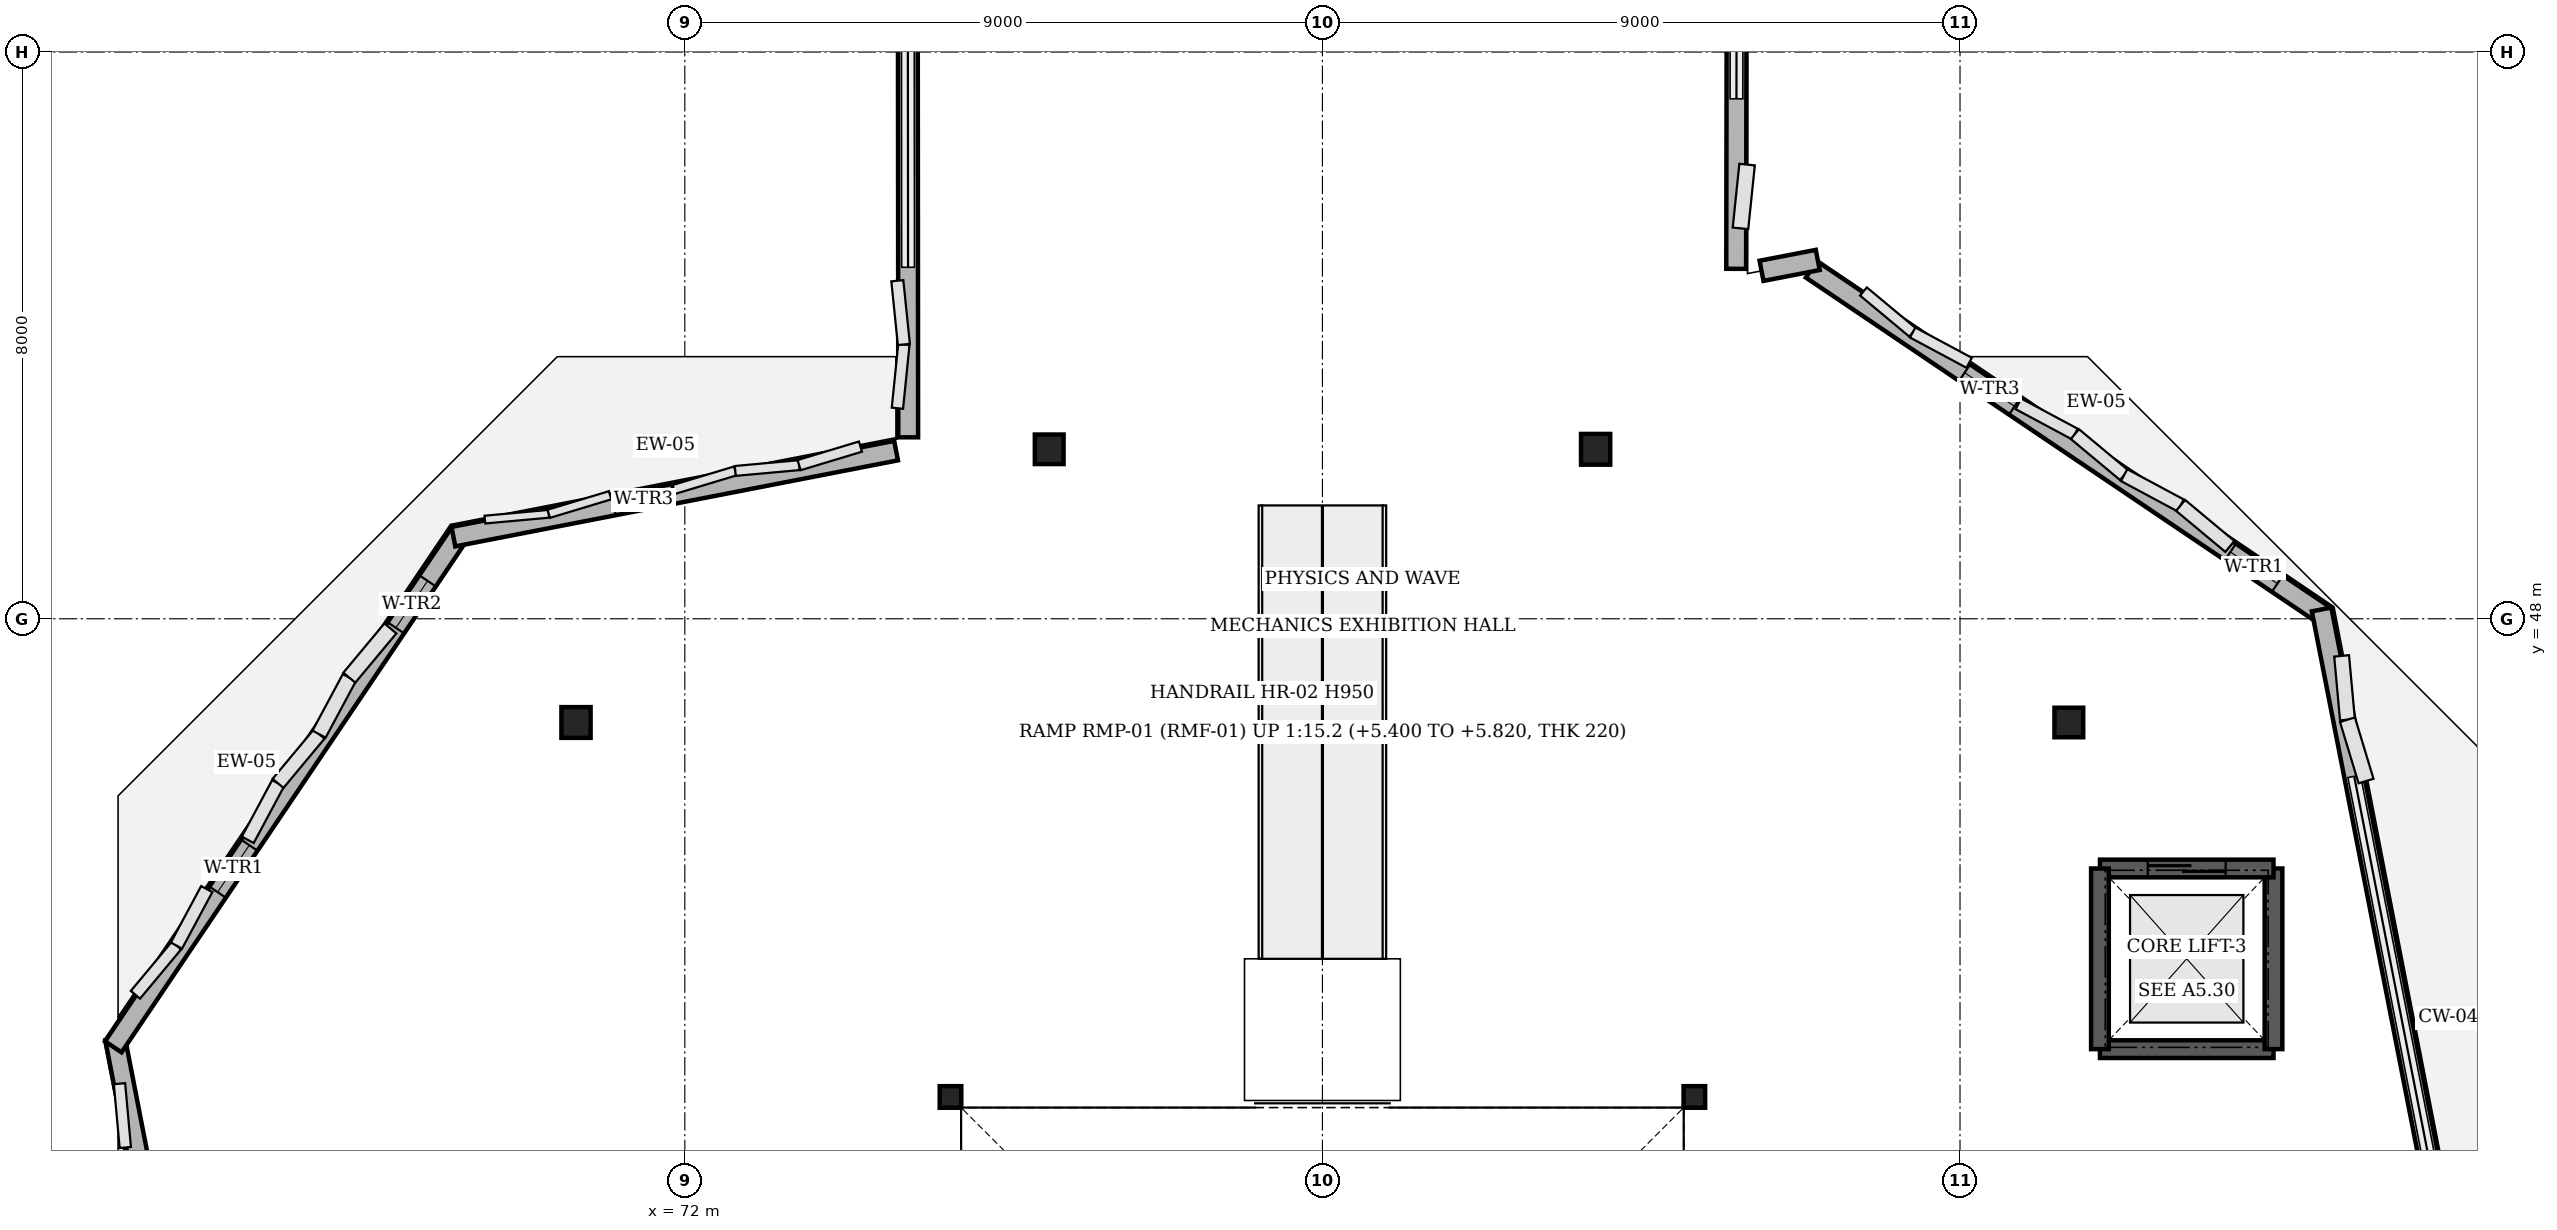
"""IFC4 building model, lengths in metres.
Left out: names, types, materials, properties, quantities, classifications, styles, units other than length and angle.
Written with IfcOpenShell. Run it as: python <this file> out.ifc"""

import sys

from ifc_helpers import new_model, si_unit, direction, frame, frame_2d, origin, origin_2d, place, context, subcontext, project, spatial, rectangle, hollow_rectangle, i_section, extrude, element, fill, save


model = new_model("IFC4")
c1 = context("Model", 3, precision=1e-05, world=origin(), true_north=direction((0.0, 1.0)))
c2 = subcontext(c1, "Body", "Model", "MODEL_VIEW")
j1 = project(units=[si_unit("LENGTHUNIT", "METRE"), si_unit("PLANEANGLEUNIT", "RADIAN")], contexts=[c1])
p1 = place(None, origin())
s1 = spatial("IfcSite", under=j1, at=p1, CompositionType="ELEMENT")
p2 = place(p1, origin())
s2 = spatial("IfcBuilding", under=s1, at=p2, CompositionType="ELEMENT")
p3 = place(p2, frame((0.0, 0.0, 5.4)))
s3 = spatial("IfcBuildingStorey", under=s2, at=p3, CompositionType="ELEMENT", Elevation=5.4)
p4 = place(p3, frame((91.536, 46.536, 0.0), z_axis=(0.0, 0.0, 1.0), x_axis=(1.0, 0.0, 0.0)))
e1 = element("IfcColumn", 1, at=p4, inside=s3, PredefinedType="COLUMN", context=c2, shape_type="SweptSolid", body=[
    extrude(i_section(OverallWidth=0.406, OverallDepth=0.417, WebThickness=0.03, FlangeThickness=0.044, FilletRadius=0.015, at=origin_2d()), origin(), (0.0, 0.0, 1.0), 5.4),
])
p5 = place(p3, frame((84.856, 50.392, 0.0), z_axis=(0.0, 0.0, 1.0), x_axis=(1.0, 0.0, 0.0)))
e2 = element("IfcColumn", 2, at=p5, inside=s3, PredefinedType="COLUMN", context=c2, shape_type="SweptSolid", body=[
    extrude(i_section(OverallWidth=0.412, OverallDepth=0.434, WebThickness=0.036, FlangeThickness=0.044, FilletRadius=0.015, at=origin_2d()), origin(), (0.0, 0.0, 1.0), 5.4),
])
p6 = place(p3, frame((77.144, 50.392, 0.0), z_axis=(0.0, 0.0, 1.0), x_axis=(1.0, 0.0, 0.0)))
e3 = element("IfcColumn", 3, at=p6, inside=s3, PredefinedType="COLUMN", context=c2, shape_type="SweptSolid", body=[
    extrude(i_section(OverallWidth=0.406, OverallDepth=0.417, WebThickness=0.03, FlangeThickness=0.044, FilletRadius=0.015, at=origin_2d()), origin(), (0.0, 0.0, 1.0), 5.4),
])
p7 = place(p3, frame((70.464, 46.536, 0.0), z_axis=(0.0, 0.0, 1.0), x_axis=(1.0, 0.0, 0.0)))
e4 = element("IfcColumn", 4, at=p7, inside=s3, PredefinedType="COLUMN", context=c2, shape_type="SweptSolid", body=[
    extrude(i_section(OverallWidth=0.412, OverallDepth=0.434, WebThickness=0.036, FlangeThickness=0.044, FilletRadius=0.015, at=origin_2d()), origin(), (0.0, 0.0, 1.0), 5.4),
])
for number, where, z_axis, x_axis in (
    (5, (86.25, 41.25, 0.0), (0.0, 0.0, 1.0), (1.0, 0.0, 0.0)),
    (6, (75.75, 41.25, 0.0), (0.0, 0.0, 1.0), (1.0, 0.0, 0.0)),
):
    element("IfcColumn", number, at=place(p3, frame(where, z_axis=z_axis, x_axis=x_axis)), inside=s3, PredefinedType="COLUMN", context=c2, shape_type="SweptSolid", body=[
        extrude(hollow_rectangle(XDim=0.305, YDim=0.305, WallThickness=0.015, InnerFilletRadius=0.015, OuterFilletRadius=0.029, at=origin_2d()), origin(), (0.0, 0.0, 1.0), 5.4),
    ])
p8 = place(p3, frame((87.902, 52.933, 0.0), z_axis=(0.0, 0.0, 1.0), x_axis=(0.829056819459, -0.559164367703, 0.0)))
e7 = element("IfcWall", 7, at=p8, inside=s3, PredefinedType="SOLIDWALL", context=c2, shape_type="SweptSolid", body=[
    extrude(rectangle(XDim=8.768, YDim=0.28, at=frame_2d((4.384, 0.0))), origin(), (0.0, 0.0, 1.0), 4.214),
])
p9 = place(p8, frame((2.609, 0.0, 1.05)))
e8 = element("IfcOpeningElement", 8, at=p9, cuts=e7, PredefinedType="OPENING", context=c2, shape_type="SweptSolid", body=[
    extrude(rectangle(XDim=0.85, YDim=1.6, at=frame_2d((0.425, 0.8))), frame((0.0, 0.15, 0.0), z_axis=(0.0, -1.0, 0.0), x_axis=(1.0, 0.0, 0.0)), (0.0, 0.0, 1.0), 0.3),
])
p10 = place(p8, frame((7.134, 0.0, 1.05)))
e9 = element("IfcOpeningElement", 9, at=p10, cuts=e7, PredefinedType="OPENING", context=c2, shape_type="SweptSolid", body=[
    extrude(rectangle(XDim=0.8, YDim=1.5, at=frame_2d((0.4, 0.75))), frame((0.0, 0.15, 0.0), z_axis=(0.0, -1.0, 0.0), x_axis=(1.0, 0.0, 0.0)), (0.0, 0.0, 1.0), 0.3),
])
p11 = place(p3, frame((95.104, 48.132, 0.0), z_axis=(0.0, 0.0, 1.0), x_axis=(0.191745445275, -0.981444692388, 0.0)))
e10 = element("IfcWall", 10, at=p11, inside=s3, PredefinedType="SOLIDWALL", context=c2, shape_type="SweptSolid", body=[
    extrude(rectangle(XDim=18.495, YDim=0.28, at=frame_2d((9.248, 0.0))), origin(), (0.0, 0.0, 1.0), 2.45),
])
p12 = place(p11, frame((11.548, 0.0, 0.6)))
e11 = element("IfcOpeningElement", 11, at=p12, cuts=e10, PredefinedType="OPENING", context=c2, shape_type="SweptSolid", body=[
    extrude(rectangle(XDim=0.8, YDim=1.7, at=frame_2d((0.4, 0.85))), frame((0.0, 0.15, 0.0), z_axis=(0.0, -1.0, 0.0), x_axis=(1.0, 0.0, 0.0)), (0.0, 0.0, 1.0), 0.3),
])
p13 = place(p11, frame((16.023, 0.0, 0.6)))
e12 = element("IfcOpeningElement", 12, at=p13, cuts=e10, PredefinedType="OPENING", context=c2, shape_type="SweptSolid", body=[
    extrude(rectangle(XDim=0.85, YDim=1.6, at=frame_2d((0.425, 0.8))), frame((0.0, 0.15, 0.0), z_axis=(0.0, -1.0, 0.0), x_axis=(1.0, 0.0, 0.0)), (0.0, 0.0, 1.0), 0.3),
])
p14 = place(p3, frame((86.858, 63.983, 0.0), z_axis=(0.0, 0.0, 1.0), x_axis=(-0.001569683245, -0.999998768046, 0.0)))
e13 = element("IfcWall", 13, at=p14, inside=s3, PredefinedType="SOLIDWALL", context=c2, shape_type="SweptSolid", body=[
    extrude(rectangle(XDim=11.043, YDim=0.28, at=frame_2d((5.521, 0.0))), origin(), (0.0, 0.0, 1.0), 2.45),
])
p15 = place(p3, frame((87.198, 52.911, 0.0), z_axis=(0.0, 0.0, 1.0), x_axis=(0.981725274071, 0.190303668512, 0.0)))
e14 = element("IfcWall", 14, at=p15, inside=s3, PredefinedType="SOLIDWALL", context=c2, shape_type="SweptSolid", body=[
    extrude(rectangle(XDim=0.808, YDim=0.29, at=frame_2d((0.404, 0.0))), origin(), (0.0, 0.0, 1.0), 4.527),
])
p16 = place(p3, frame((66.09, 31.102, 0.0), z_axis=(0.0, 0.0, 1.0), x_axis=(-0.19080127766, 0.981628683588, 0.0)))
e15 = element("IfcWall", 15, at=p16, inside=s3, PredefinedType="SOLIDWALL", context=c2, shape_type="SweptSolid", body=[
    extrude(rectangle(XDim=11.181, YDim=0.28, at=frame_2d((5.59, 0.0))), origin(), (0.0, 0.0, 1.0), 2.45),
])
p17 = place(p3, frame((63.932, 41.958, 0.0), z_axis=(0.0, 0.0, 1.0), x_axis=(0.559196413649, 0.829035204899, 0.0)))
e16 = element("IfcWall", 16, at=p17, inside=s3, PredefinedType="SOLIDWALL", context=c2, shape_type="SweptSolid", body=[
    extrude(rectangle(XDim=8.768, YDim=0.28, at=frame_2d((4.384, 0.0))), origin(), (0.0, 0.0, 1.0), 4.204),
])
p18 = place(p17, frame((2.634, 0.0, 1.05)))
e17 = element("IfcOpeningElement", 17, at=p18, cuts=e16, PredefinedType="OPENING", context=c2, shape_type="SweptSolid", body=[
    extrude(rectangle(XDim=0.8, YDim=1.5, at=frame_2d((0.4, 0.75))), frame((0.0, 0.15, 0.0), z_axis=(0.0, -1.0, 0.0), x_axis=(1.0, 0.0, 0.0)), (0.0, 0.0, 1.0), 0.3),
])
p19 = place(p17, frame((7.134, 0.0, 1.05)))
e18 = element("IfcOpeningElement", 18, at=p19, cuts=e16, PredefinedType="OPENING", context=c2, shape_type="SweptSolid", body=[
    extrude(rectangle(XDim=0.8, YDim=1.7, at=frame_2d((0.4, 0.85))), frame((0.0, 0.15, 0.0), z_axis=(0.0, -1.0, 0.0), x_axis=(1.0, 0.0, 0.0)), (0.0, 0.0, 1.0), 0.3),
])
p20 = place(p3, frame((68.733, 49.159, 0.0), z_axis=(0.0, 0.0, 1.0), x_axis=(0.98162696529, 0.190810117696, 0.0)))
e19 = element("IfcWall", 19, at=p20, inside=s3, PredefinedType="SOLIDWALL", context=c2, shape_type="SweptSolid", body=[
    extrude(rectangle(XDim=6.365, YDim=0.28, at=frame_2d((3.183, 0.0))), origin(), (0.0, 0.0, 1.0), 4.209),
])
p21 = place(p20, frame((2.308, 0.0, 1.05)))
e20 = element("IfcOpeningElement", 20, at=p21, cuts=e19, PredefinedType="OPENING", context=c2, shape_type="SweptSolid", body=[
    extrude(rectangle(XDim=0.85, YDim=1.6, at=frame_2d((0.425, 0.8))), frame((0.0, 0.15, 0.0), z_axis=(0.0, -1.0, 0.0), x_axis=(1.0, 0.0, 0.0)), (0.0, 0.0, 1.0), 0.3),
])
p22 = place(p3, frame((75.153, 50.561, 0.0), z_axis=(0.0, 0.0, 1.0), x_axis=(-0.000782187704, 0.999999694091, 0.0)))
e21 = element("IfcWall", 21, at=p22, inside=s3, PredefinedType="SOLIDWALL", context=c2, shape_type="SweptSolid", body=[
    extrude(rectangle(XDim=13.421, YDim=0.28, at=frame_2d((6.711, 0.0))), origin(), (0.0, 0.0, 1.0), 2.45),
])
p23 = place(p22, frame((11.26, 0.0, 0.6)))
e22 = element("IfcOpeningElement", 22, at=p23, cuts=e21, PredefinedType="OPENING", context=c2, shape_type="SweptSolid", body=[
    extrude(rectangle(XDim=0.8, YDim=1.5, at=frame_2d((0.4, 0.75))), frame((0.0, 0.15, 0.0), z_axis=(0.0, -1.0, 0.0), x_axis=(1.0, 0.0, 0.0)), (0.0, 0.0, 1.0), 0.3),
])
p24 = place(p3, frame((91.975, 41.925, 0.0), z_axis=(0.0, 0.0, 1.0), x_axis=(1.0, 0.0, 0.0)))
e23 = element("IfcWall", 23, at=p24, inside=s3, PredefinedType="SOLIDWALL", context=c2, shape_type="SweptSolid", body=[
    extrude(rectangle(XDim=2.45, YDim=0.25, at=frame_2d((1.225, 0.0))), origin(), (0.0, 0.0, 1.0), 5.4),
])
p25 = place(p3, frame((94.425, 41.925, 0.0), z_axis=(0.0, 0.0, 1.0), x_axis=(0.0, 1.0, 0.0)))
e24 = element("IfcWall", 24, at=p25, inside=s3, PredefinedType="SOLIDWALL", context=c2, shape_type="SweptSolid", body=[
    extrude(rectangle(XDim=2.55, YDim=0.25, at=frame_2d((1.275, 0.0))), origin(), (0.0, 0.0, 1.0), 5.4),
])
p26 = place(p3, frame((94.425, 44.475, 0.0), z_axis=(0.0, 0.0, 1.0), x_axis=(-1.0, 0.0, 0.0)))
e25 = element("IfcWall", 25, at=p26, inside=s3, PredefinedType="SOLIDWALL", context=c2, shape_type="SweptSolid", body=[
    extrude(rectangle(XDim=2.45, YDim=0.25, at=frame_2d((1.225, 0.0))), origin(), (0.0, 0.0, 1.0), 5.4),
])
p27 = place(p26, frame((0.675, 0.0, 0.0)))
e26 = element("IfcOpeningElement", 26, at=p27, cuts=e25, PredefinedType="OPENING", context=c2, shape_type="SweptSolid", body=[
    extrude(rectangle(XDim=1.1, YDim=2.2, at=frame_2d((0.55, 1.1))), frame((0.0, 0.135, 0.0), z_axis=(0.0, -1.0, 0.0), x_axis=(1.0, 0.0, 0.0)), (0.0, 0.0, 1.0), 0.27),
])
p28 = place(p3, frame((91.975, 44.475, 0.0), z_axis=(0.0, 0.0, 1.0), x_axis=(0.0, -1.0, 0.0)))
e27 = element("IfcWall", 27, at=p28, inside=s3, PredefinedType="SOLIDWALL", context=c2, shape_type="SweptSolid", body=[
    extrude(rectangle(XDim=2.55, YDim=0.25, at=frame_2d((1.275, 0.0))), origin(), (0.0, 0.0, 1.0), 5.4),
])
p29 = place(p9, origin())
e28 = element("IfcWindow", 28, at=p29, inside=s3, PartitioningType="SINGLE_PANEL", PredefinedType="WINDOW", context=c2, shape_type="SweptSolid", body=[
    extrude(rectangle(XDim=0.85, YDim=1.6, at=frame_2d((0.425, 0.8))), frame((0.0, 0.03, 0.0), z_axis=(0.0, -1.0, 0.0), x_axis=(1.0, 0.0, 0.0)), (0.0, 0.0, 1.0), 0.06),
])
fill(e8, e28)
p30 = place(p10, origin())
e29 = element("IfcWindow", 29, at=p30, inside=s3, PartitioningType="SINGLE_PANEL", PredefinedType="WINDOW", context=c2, shape_type="SweptSolid", body=[
    extrude(rectangle(XDim=0.8, YDim=1.5, at=frame_2d((0.4, 0.75))), frame((0.0, 0.03, 0.0), z_axis=(0.0, -1.0, 0.0), x_axis=(1.0, 0.0, 0.0)), (0.0, 0.0, 1.0), 0.06),
])
fill(e9, e29)
p31 = place(p18, origin())
e30 = element("IfcWindow", 30, at=p31, inside=s3, PartitioningType="SINGLE_PANEL", PredefinedType="WINDOW", context=c2, shape_type="SweptSolid", body=[
    extrude(rectangle(XDim=0.8, YDim=1.5, at=frame_2d((0.4, 0.75))), frame((0.0, 0.03, 0.0), z_axis=(0.0, -1.0, 0.0), x_axis=(1.0, 0.0, 0.0)), (0.0, 0.0, 1.0), 0.06),
])
fill(e17, e30)
p32 = place(p19, origin())
e31 = element("IfcWindow", 31, at=p32, inside=s3, PartitioningType="SINGLE_PANEL", PredefinedType="WINDOW", context=c2, shape_type="SweptSolid", body=[
    extrude(rectangle(XDim=0.8, YDim=1.7, at=frame_2d((0.4, 0.85))), frame((0.0, 0.03, 0.0), z_axis=(0.0, -1.0, 0.0), x_axis=(1.0, 0.0, 0.0)), (0.0, 0.0, 1.0), 0.06),
])
fill(e18, e31)
p33 = place(p21, origin())
e32 = element("IfcWindow", 32, at=p33, inside=s3, PartitioningType="SINGLE_PANEL", PredefinedType="WINDOW", context=c2, shape_type="SweptSolid", body=[
    extrude(rectangle(XDim=0.85, YDim=1.6, at=frame_2d((0.425, 0.8))), frame((0.0, 0.03, 0.0), z_axis=(0.0, -1.0, 0.0), x_axis=(1.0, 0.0, 0.0)), (0.0, 0.0, 1.0), 0.06),
])
fill(e20, e32)
p34 = place(p27, origin())
e33 = element("IfcDoor", 33, at=p34, inside=s3, OperationType="SLIDING_TO_LEFT", PredefinedType="DOOR", context=c2, shape_type="SweptSolid", body=[
    extrude(rectangle(XDim=1.1, YDim=2.2, at=frame_2d((0.55, 1.1))), frame((0.0, 0.025, 0.0), z_axis=(0.0, -1.0, 0.0), x_axis=(1.0, 0.0, 0.0)), (0.0, 0.0, 1.0), 0.05),
])
fill(e26, e33)
save(model, sys.argv[1])
